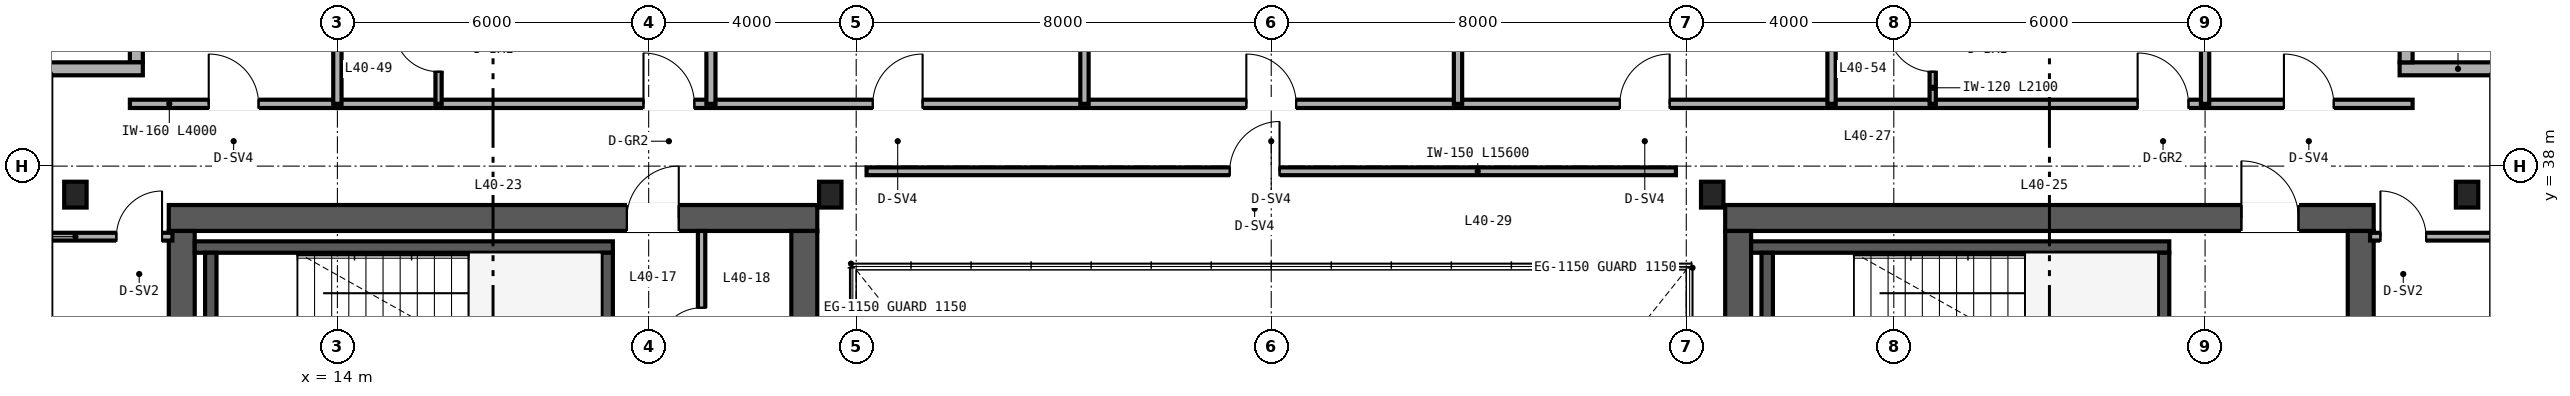
"""IFC4 building model, lengths in metres.
Left out: names, types, materials, properties, quantities, classifications, styles, units other than length and angle.
Written with IfcOpenShell. Run it as: python <this file> out.ifc"""

import sys

from ifc_helpers import new_model, si_unit, direction, frame, frame_2d, origin, origin_2d, place, context, subcontext, project, spatial, rectangle, i_section, extrude, source, transform, mapped, element, fill, save


model = new_model("IFC4")
c1 = context("Model", 3, precision=1e-05, world=origin(), true_north=direction((0.0, 1.0)))
c2 = subcontext(c1, "Body", "Model", "MODEL_VIEW")
j1 = project(units=[si_unit("LENGTHUNIT", "METRE"), si_unit("PLANEANGLEUNIT", "RADIAN")], contexts=[c1])
p1 = place(None, origin())
s1 = spatial("IfcSite", under=j1, at=p1, CompositionType="ELEMENT")
p2 = place(p1, origin())
s2 = spatial("IfcBuilding", under=s1, at=p2, CompositionType="ELEMENT")
p3 = place(p2, frame((0.0, 0.0, 163.2)))
s3 = spatial("IfcBuildingStorey", under=s2, at=p3, CompositionType="ELEMENT", Elevation=163.2)
p4 = place(p3, frame((10.75, 37.0, 0.0), z_axis=(0.0, 0.0, 1.0), x_axis=(1.0, 0.0, 0.0)))
e1 = element("IfcWall", 1, at=p4, inside=s3, PredefinedType="SHEAR", context=c2, shape_type="SweptSolid", body=[
    extrude(rectangle(XDim=12.5, YDim=0.5, at=frame_2d((6.25, 0.0))), origin(), (0.0, 0.0, 1.0), 3.37),
])
p5 = place(p4, frame((8.83, 0.0, 0.0)))
e2 = element("IfcOpeningElement", 2, at=p5, cuts=e1, PredefinedType="OPENING", context=c2, shape_type="SweptSolid", body=[
    extrude(rectangle(XDim=1.0, YDim=2.15, at=frame_2d((0.5, 1.075))), frame((0.0, 0.26, 0.0), z_axis=(0.0, -1.0, 0.0), x_axis=(1.0, 0.0, 0.0)), (0.0, 0.0, 1.0), 0.52),
])
for number, where, z_axis, x_axis in (
    (3, (11.0, 15.25, 0.0), (0.0, 0.0, 1.0), (0.0, 1.0, 0.0)),
    (4, (23.0, 15.25, 0.0), (0.0, 0.0, 1.0), (0.0, 1.0, 0.0)),
):
    element("IfcWall", number, at=place(p3, frame(where, z_axis=z_axis, x_axis=x_axis)), inside=s3, PredefinedType="SHEAR", context=c2, shape_type="SweptSolid", body=[
        extrude(rectangle(XDim=21.5, YDim=0.5, at=frame_2d((10.75, 0.0))), origin(), (0.0, 0.0, 1.0), 3.37),
    ])
p6 = place(p3, frame((40.75, 37.0, 0.0), z_axis=(0.0, 0.0, 1.0), x_axis=(1.0, 0.0, 0.0)))
e5 = element("IfcWall", 5, at=p6, inside=s3, PredefinedType="SHEAR", context=c2, shape_type="SweptSolid", body=[
    extrude(rectangle(XDim=12.5, YDim=0.5, at=frame_2d((6.25, 0.0))), origin(), (0.0, 0.0, 1.0), 3.37),
])
p7 = place(p6, frame((9.95, 0.0, 0.0)))
e6 = element("IfcOpeningElement", 6, at=p7, cuts=e5, PredefinedType="OPENING", context=c2, shape_type="SweptSolid", body=[
    extrude(rectangle(XDim=1.1, YDim=2.15, at=frame_2d((0.55, 1.075))), frame((0.0, 0.26, 0.0), z_axis=(0.0, -1.0, 0.0), x_axis=(1.0, 0.0, 0.0)), (0.0, 0.0, 1.0), 0.52),
])
for number, where, z_axis, x_axis in (
    (7, (41.0, 15.25, 0.0), (0.0, 0.0, 1.0), (0.0, 1.0, 0.0)),
    (8, (53.0, 15.25, 0.0), (0.0, 0.0, 1.0), (0.0, 1.0, 0.0)),
):
    element("IfcWall", number, at=place(p3, frame(where, z_axis=z_axis, x_axis=x_axis)), inside=s3, PredefinedType="SHEAR", context=c2, shape_type="SweptSolid", body=[
        extrude(rectangle(XDim=21.5, YDim=0.5, at=frame_2d((10.75, 0.0))), origin(), (0.0, 0.0, 1.0), 3.37),
    ])
p8 = place(p3, frame((11.25, 36.44, 0.0), z_axis=(0.0, 0.0, 1.0), x_axis=(1.0, 0.0, 0.0)))
e9 = element("IfcWall", 9, at=p8, inside=s3, PredefinedType="SHEAR", context=c2, shape_type="SweptSolid", body=[
    extrude(rectangle(XDim=8.06, YDim=0.22, at=frame_2d((4.03, 0.0))), origin(), (0.0, 0.0, 1.0), 3.4),
])
for number, where, z_axis, x_axis in (
    (10, (11.56, 33.05, 0.0), (0.0, 0.0, 1.0), (0.0, 1.0, 0.0)),
    (11, (19.2, 33.05, 0.0), (0.0, 0.0, 1.0), (0.0, 1.0, 0.0)),
):
    element("IfcWall", number, at=place(p3, frame(where, z_axis=z_axis, x_axis=x_axis)), inside=s3, PredefinedType="SHEAR", context=c2, shape_type="SweptSolid", body=[
        extrude(rectangle(XDim=3.28, YDim=0.22, at=frame_2d((1.64, 0.0))), origin(), (0.0, 0.0, 1.0), 3.4),
    ])
p9 = place(p3, frame((41.25, 36.44, 0.0), z_axis=(0.0, 0.0, 1.0), x_axis=(1.0, 0.0, 0.0)))
e12 = element("IfcWall", 12, at=p9, inside=s3, PredefinedType="SHEAR", context=c2, shape_type="SweptSolid", body=[
    extrude(rectangle(XDim=8.06, YDim=0.22, at=frame_2d((4.03, 0.0))), origin(), (0.0, 0.0, 1.0), 3.4),
])
for number, where, z_axis, x_axis in (
    (13, (41.56, 33.05, 0.0), (0.0, 0.0, 1.0), (0.0, 1.0, 0.0)),
    (14, (49.2, 33.05, 0.0), (0.0, 0.0, 1.0), (0.0, 1.0, 0.0)),
):
    element("IfcWall", number, at=place(p3, frame(where, z_axis=z_axis, x_axis=x_axis)), inside=s3, PredefinedType="SHEAR", context=c2, shape_type="SweptSolid", body=[
        extrude(rectangle(XDim=3.28, YDim=0.22, at=frame_2d((1.64, 0.0))), origin(), (0.0, 0.0, 1.0), 3.4),
    ])
m1 = source(origin(), c2, "Body", "SweptSolid", [
    extrude(i_section(OverallWidth=0.432, OverallDepth=0.498, WebThickness=0.056, FlangeThickness=0.089, FilletRadius=0.025, at=origin_2d()), origin(), (0.0, 0.0, 1.0), 3.37),
])
for number, where, z_axis, x_axis in (
    (15, (8.95, 37.45, 0.0), (0.0, 0.0, 1.0), (1.0, 0.0, 0.0)),
    (16, (23.5, 37.45, 0.0), (0.0, 0.0, 1.0), (1.0, 0.0, 0.0)),
    (17, (40.5, 37.45, 0.0), (0.0, 0.0, 1.0), (1.0, 0.0, 0.0)),
    (18, (55.05, 37.45, 0.0), (0.0, 0.0, 1.0), (1.0, 0.0, 0.0)),
):
    element("IfcColumn", number, at=place(p3, frame(where, z_axis=z_axis, x_axis=x_axis)), inside=s3, PredefinedType="COLUMN", context=c2, shape_type="MappedRepresentation", body=[
        mapped(m1, transform((0.0, 0.0, 0.0), scale=1.0)),
    ])
p10 = place(p3, frame((56.0, 39.875, 0.0), z_axis=(0.0, 0.0, 1.0), x_axis=(-1.0, 0.0, 0.0)))
e19 = element("IfcWall", 19, at=p10, inside=s3, PredefinedType="SOLIDWALL", context=c2, shape_type="SweptSolid", body=[
    extrude(rectangle(XDim=2.25, YDim=0.25, at=frame_2d((1.125, 0.0))), origin(), (0.0, 0.0, 1.0), 3.37),
])
for number, where, z_axis, x_axis in (
    (20, (53.875, 40.0, 0.0), (0.0, 0.0, 1.0), (0.0, 1.0, 0.0)),
    (21, (10.125, 42.0, 0.0), (0.0, 0.0, 1.0), (0.0, -1.0, 0.0)),
):
    element("IfcWall", number, at=place(p3, frame(where, z_axis=z_axis, x_axis=x_axis)), inside=s3, PredefinedType="SOLIDWALL", context=c2, shape_type="SweptSolid", body=[
        extrude(rectangle(XDim=2.0, YDim=0.25, at=frame_2d((1.0, 0.0))), origin(), (0.0, 0.0, 1.0), 3.37),
    ])
p11 = place(p3, frame((10.25, 39.875, 0.0), z_axis=(0.0, 0.0, 1.0), x_axis=(-1.0, 0.0, 0.0)))
e22 = element("IfcWall", 22, at=p11, inside=s3, PredefinedType="SOLIDWALL", context=c2, shape_type="SweptSolid", body=[
    extrude(rectangle(XDim=2.25, YDim=0.25, at=frame_2d((1.125, 0.0))), origin(), (0.0, 0.0, 1.0), 3.37),
])
p12 = place(p3, frame((21.02, 33.28, 0.0), z_axis=(0.0, 0.0, 1.0), x_axis=(0.0, 1.0, 0.0)))
e23 = element("IfcWall", 23, at=p12, inside=s3, PredefinedType="PARTITIONING", context=c2, shape_type="SweptSolid", body=[
    extrude(rectangle(XDim=3.47, YDim=0.142, at=frame_2d((1.735, 0.0))), origin(), (0.0, 0.0, 1.0), 3.37),
])
p13 = place(p12, frame((1.15, 0.0, 0.0)))
e24 = element("IfcOpeningElement", 24, at=p13, cuts=e23, PredefinedType="OPENING", context=c2, shape_type="SweptSolid", body=[
    extrude(rectangle(XDim=0.84, YDim=2.1, at=frame_2d((0.42, 1.05))), frame((0.0, 0.081, 0.0), z_axis=(0.0, -1.0, 0.0), x_axis=(1.0, 0.0, 0.0)), (0.0, 0.0, 1.0), 0.162),
])
p14 = place(p3, frame((24.2, 37.9, 0.0), z_axis=(0.0, 0.0, 1.0), x_axis=(1.0, 0.0, 0.0)))
e25 = element("IfcWall", 25, at=p14, inside=s3, PredefinedType="PARTITIONING", context=c2, shape_type="SweptSolid", body=[
    extrude(rectangle(XDim=15.6, YDim=0.15, at=frame_2d((7.8, 0.0))), origin(), (0.0, 0.0, 1.0), 3.37),
])
p15 = place(p14, frame((7.0, 0.0, 0.0)))
e26 = element("IfcOpeningElement", 26, at=p15, cuts=e25, PredefinedType="OPENING", context=c2, shape_type="SweptSolid", body=[
    extrude(rectangle(XDim=0.96, YDim=2.15, at=frame_2d((0.48, 1.075))), frame((0.0, 0.085, 0.0), z_axis=(0.0, -1.0, 0.0), x_axis=(1.0, 0.0, 0.0)), (0.0, 0.0, 1.0), 0.17),
])
p16 = place(p3, frame((8.16, 36.64, 0.0), z_axis=(0.0, 0.0, 1.0), x_axis=(1.0, 0.0, 0.0)))
e27 = element("IfcWall", 27, at=p16, inside=s3, PredefinedType="PARTITIONING", context=c2, shape_type="SweptSolid", body=[
    extrude(rectangle(XDim=2.66, YDim=0.15, at=frame_2d((1.33, 0.0))), origin(), (0.0, 0.0, 1.0), 2.753),
])
p17 = place(p16, frame((1.58, 0.0, 0.0)))
e28 = element("IfcOpeningElement", 28, at=p17, cuts=e27, PredefinedType="OPENING", context=c2, shape_type="SweptSolid", body=[
    extrude(rectangle(XDim=0.88, YDim=2.15, at=frame_2d((0.44, 1.075))), frame((0.0, 0.085, 0.0), z_axis=(0.0, -1.0, 0.0), x_axis=(1.0, 0.0, 0.0)), (0.0, 0.0, 1.0), 0.17),
])
p18 = place(p3, frame((53.18, 36.64, 0.0), z_axis=(0.0, 0.0, 1.0), x_axis=(1.0, 0.0, 0.0)))
e29 = element("IfcWall", 29, at=p18, inside=s3, PredefinedType="PARTITIONING", context=c2, shape_type="SweptSolid", body=[
    extrude(rectangle(XDim=2.66, YDim=0.15, at=frame_2d((1.33, 0.0))), origin(), (0.0, 0.0, 1.0), 2.753),
])
p19 = place(p18, frame((0.2, 0.0, 0.0)))
e30 = element("IfcOpeningElement", 30, at=p19, cuts=e29, PredefinedType="OPENING", context=c2, shape_type="SweptSolid", body=[
    extrude(rectangle(XDim=0.88, YDim=2.15, at=frame_2d((0.44, 1.075))), frame((0.0, 0.085, 0.0), z_axis=(0.0, -1.0, 0.0), x_axis=(1.0, 0.0, 0.0)), (0.0, 0.0, 1.0), 0.17),
])
p20 = place(p3, frame((10.0, 39.2, 0.0), z_axis=(0.0, 0.0, 1.0), x_axis=(1.0, 0.0, 0.0)))
e31 = element("IfcWall", 31, at=p20, inside=s3, PredefinedType="PARTITIONING", context=c2, shape_type="SweptSolid", body=[
    extrude(rectangle(XDim=4.0, YDim=0.16, at=frame_2d((2.0, 0.0))), origin(), (0.0, 0.0, 1.0), 3.37),
])
p21 = place(p20, frame((1.52, 0.0, 0.0)))
e32 = element("IfcOpeningElement", 32, at=p21, cuts=e31, PredefinedType="OPENING", context=c2, shape_type="SweptSolid", body=[
    extrude(rectangle(XDim=0.96, YDim=2.15, at=frame_2d((0.48, 1.075))), frame((0.0, 0.09, 0.0), z_axis=(0.0, -1.0, 0.0), x_axis=(1.0, 0.0, 0.0)), (0.0, 0.0, 1.0), 0.18),
])
p22 = place(p3, frame((50.0, 39.2, 0.0), z_axis=(0.0, 0.0, 1.0), x_axis=(1.0, 0.0, 0.0)))
e33 = element("IfcWall", 33, at=p22, inside=s3, PredefinedType="PARTITIONING", context=c2, shape_type="SweptSolid", body=[
    extrude(rectangle(XDim=4.0, YDim=0.16, at=frame_2d((2.0, 0.0))), origin(), (0.0, 0.0, 1.0), 3.37),
])
p23 = place(p22, frame((1.52, 0.0, 0.0)))
e34 = element("IfcOpeningElement", 34, at=p23, cuts=e33, PredefinedType="OPENING", context=c2, shape_type="SweptSolid", body=[
    extrude(rectangle(XDim=0.96, YDim=2.15, at=frame_2d((0.48, 1.075))), frame((0.0, 0.09, 0.0), z_axis=(0.0, -1.0, 0.0), x_axis=(1.0, 0.0, 0.0)), (0.0, 0.0, 1.0), 0.18),
])
p24 = place(p3, frame((14.0, 39.2, 0.0), z_axis=(0.0, 0.0, 1.0), x_axis=(1.0, 0.0, 0.0)))
e35 = element("IfcWall", 35, at=p24, inside=s3, PredefinedType="PARTITIONING", context=c2, shape_type="SweptSolid", body=[
    extrude(rectangle(XDim=36.0, YDim=0.16, at=frame_2d((18.0, 0.0))), origin(), (0.0, 0.0, 1.0), 2.913),
])
p25 = place(p24, frame((5.9, 0.0, 0.0)))
e36 = element("IfcOpeningElement", 36, at=p25, cuts=e35, PredefinedType="OPENING", context=c2, shape_type="SweptSolid", body=[
    extrude(rectangle(XDim=0.98, YDim=2.2, at=frame_2d((0.49, 1.1))), frame((0.0, 0.09, 0.0), z_axis=(0.0, -1.0, 0.0), x_axis=(1.0, 0.0, 0.0)), (0.0, 0.0, 1.0), 0.18),
])
p26 = place(p24, frame((10.32, 0.0, 0.0)))
e37 = element("IfcOpeningElement", 37, at=p26, cuts=e35, PredefinedType="OPENING", context=c2, shape_type="SweptSolid", body=[
    extrude(rectangle(XDim=0.96, YDim=2.15, at=frame_2d((0.48, 1.075))), frame((0.0, 0.09, 0.0), z_axis=(0.0, -1.0, 0.0), x_axis=(1.0, 0.0, 0.0)), (0.0, 0.0, 1.0), 0.18),
])
p27 = place(p24, frame((17.52, 0.0, 0.0)))
e38 = element("IfcOpeningElement", 38, at=p27, cuts=e35, PredefinedType="OPENING", context=c2, shape_type="SweptSolid", body=[
    extrude(rectangle(XDim=0.96, YDim=2.15, at=frame_2d((0.48, 1.075))), frame((0.0, 0.09, 0.0), z_axis=(0.0, -1.0, 0.0), x_axis=(1.0, 0.0, 0.0)), (0.0, 0.0, 1.0), 0.18),
])
p28 = place(p24, frame((24.72, 0.0, 0.0)))
e39 = element("IfcOpeningElement", 39, at=p28, cuts=e35, PredefinedType="OPENING", context=c2, shape_type="SweptSolid", body=[
    extrude(rectangle(XDim=0.96, YDim=2.15, at=frame_2d((0.48, 1.075))), frame((0.0, 0.09, 0.0), z_axis=(0.0, -1.0, 0.0), x_axis=(1.0, 0.0, 0.0)), (0.0, 0.0, 1.0), 0.18),
])
p29 = place(p24, frame((34.7, 0.0, 0.0)))
e40 = element("IfcOpeningElement", 40, at=p29, cuts=e35, PredefinedType="OPENING", context=c2, shape_type="SweptSolid", body=[
    extrude(rectangle(XDim=0.98, YDim=2.2, at=frame_2d((0.49, 1.1))), frame((0.0, 0.09, 0.0), z_axis=(0.0, -1.0, 0.0), x_axis=(1.0, 0.0, 0.0)), (0.0, 0.0, 1.0), 0.18),
])
for number, where, z_axis, x_axis in (
    (41, (14.0, 39.2, 0.0), (0.0, 0.0, 1.0), (0.0, 1.0, 0.0)),
    (42, (50.0, 39.2, 0.0), (0.0, 0.0, 1.0), (0.0, 1.0, 0.0)),
):
    element("IfcWall", number, at=place(p3, frame(where, z_axis=z_axis, x_axis=x_axis)), inside=s3, PredefinedType="PARTITIONING", context=c2, shape_type="SweptSolid", body=[
        extrude(rectangle(XDim=6.44, YDim=0.16, at=frame_2d((3.22, 0.0))), origin(), (0.0, 0.0, 1.0), 2.677),
    ])
p30 = place(p3, frame((21.2, 39.2, 0.0), z_axis=(0.0, 0.0, 1.0), x_axis=(0.0, 1.0, 0.0)))
e43 = element("IfcWall", 43, at=p30, inside=s3, PredefinedType="PARTITIONING", context=c2, shape_type="SweptSolid", body=[
    extrude(rectangle(XDim=6.44, YDim=0.175, at=frame_2d((3.22, 0.0))), origin(), (0.0, 0.0, 1.0), 2.833),
])
p31 = place(p3, frame((15.95, 39.2, 0.0), z_axis=(0.0, 0.0, 1.0), x_axis=(0.0, 1.0, 0.0)))
e44 = element("IfcWall", 44, at=p31, inside=s3, PredefinedType="PARTITIONING", context=c2, shape_type="SweptSolid", body=[
    extrude(rectangle(XDim=2.1, YDim=0.12, at=frame_2d((1.05, 0.0))), origin(), (0.0, 0.0, 1.0), 3.37),
])
p32 = place(p31, frame((0.62, 0.0, 0.0)))
e45 = element("IfcOpeningElement", 45, at=p32, cuts=e44, PredefinedType="OPENING", context=c2, shape_type="SweptSolid", body=[
    extrude(rectangle(XDim=0.86, YDim=2.1, at=frame_2d((0.43, 1.05))), frame((0.0, 0.07, 0.0), z_axis=(0.0, -1.0, 0.0), x_axis=(1.0, 0.0, 0.0)), (0.0, 0.0, 1.0), 0.14),
])
for number, where, z_axis, x_axis in (
    (46, (28.4, 39.2, 0.0), (0.0, 0.0, 1.0), (0.0, 1.0, 0.0)),
    (47, (35.6, 39.2, 0.0), (0.0, 0.0, 1.0), (0.0, 1.0, 0.0)),
):
    element("IfcWall", number, at=place(p3, frame(where, z_axis=z_axis, x_axis=x_axis)), inside=s3, PredefinedType="PARTITIONING", context=c2, shape_type="SweptSolid", body=[
        extrude(rectangle(XDim=6.44, YDim=0.16, at=frame_2d((3.22, 0.0))), origin(), (0.0, 0.0, 1.0), 2.443),
    ])
p33 = place(p3, frame((42.8, 39.2, 0.0), z_axis=(0.0, 0.0, 1.0), x_axis=(0.0, 1.0, 0.0)))
e48 = element("IfcWall", 48, at=p33, inside=s3, PredefinedType="PARTITIONING", context=c2, shape_type="SweptSolid", body=[
    extrude(rectangle(XDim=6.44, YDim=0.16, at=frame_2d((3.22, 0.0))), origin(), (0.0, 0.0, 1.0), 2.833),
])
p34 = place(p3, frame((44.75, 39.2, 0.0), z_axis=(0.0, 0.0, 1.0), x_axis=(0.0, 1.0, 0.0)))
e49 = element("IfcWall", 49, at=p34, inside=s3, PredefinedType="PARTITIONING", context=c2, shape_type="SweptSolid", body=[
    extrude(rectangle(XDim=2.1, YDim=0.12, at=frame_2d((1.05, 0.0))), origin(), (0.0, 0.0, 1.0), 3.37),
])
p35 = place(p34, frame((0.62, 0.0, 0.0)))
e50 = element("IfcOpeningElement", 50, at=p35, cuts=e49, PredefinedType="OPENING", context=c2, shape_type="SweptSolid", body=[
    extrude(rectangle(XDim=0.86, YDim=2.1, at=frame_2d((0.43, 1.05))), frame((0.0, 0.07, 0.0), z_axis=(0.0, -1.0, 0.0), x_axis=(1.0, 0.0, 0.0)), (0.0, 0.0, 1.0), 0.14),
])
m2 = source(origin(), c2, "Body", "SweptSolid", [
    extrude(rectangle(XDim=0.84, YDim=2.1, at=frame_2d((0.42, 1.05))), frame((0.0, 0.025, 0.0), z_axis=(0.0, -1.0, 0.0), x_axis=(1.0, 0.0, 0.0)), (0.0, 0.0, 1.0), 0.05),
])
p36 = place(p13, origin())
e51 = element("IfcDoor", 51, at=p36, inside=s3, OperationType="SINGLE_SWING_LEFT", PredefinedType="DOOR", context=c2, shape_type="MappedRepresentation", body=[
    mapped(m2, transform((0.0, 0.0, 0.0), scale=1.0)),
])
fill(e24, e51)
m3 = source(origin(), c2, "Body", "SweptSolid", [
    extrude(rectangle(XDim=1.0, YDim=2.15, at=frame_2d((0.5, 1.075))), frame((0.0, 0.025, 0.0), z_axis=(0.0, -1.0, 0.0), x_axis=(1.0, 0.0, 0.0)), (0.0, 0.0, 1.0), 0.05),
])
p37 = place(p5, origin())
e52 = element("IfcDoor", 52, at=p37, inside=s3, OperationType="SINGLE_SWING_RIGHT", PredefinedType="DOOR", context=c2, shape_type="MappedRepresentation", body=[
    mapped(m3, transform((0.0, 0.0, 0.0), scale=1.0)),
])
fill(e2, e52)
m4 = source(origin(), c2, "Body", "SweptSolid", [
    extrude(rectangle(XDim=1.1, YDim=2.15, at=frame_2d((0.55, 1.075))), frame((0.0, 0.025, 0.0), z_axis=(0.0, -1.0, 0.0), x_axis=(1.0, 0.0, 0.0)), (0.0, 0.0, 1.0), 0.05),
])
p38 = place(p7, origin())
e53 = element("IfcDoor", 53, at=p38, inside=s3, OperationType="SINGLE_SWING_LEFT", PredefinedType="DOOR", context=c2, shape_type="MappedRepresentation", body=[
    mapped(m4, transform((0.0, 0.0, 0.0), scale=1.0)),
])
fill(e6, e53)
m5 = source(origin(), c2, "Body", "SweptSolid", [
    extrude(rectangle(XDim=0.96, YDim=2.15, at=frame_2d((0.48, 1.075))), frame((0.0, 0.025, 0.0), z_axis=(0.0, -1.0, 0.0), x_axis=(1.0, 0.0, 0.0)), (0.0, 0.0, 1.0), 0.05),
])
p39 = place(p15, origin())
e54 = element("IfcDoor", 54, at=p39, inside=s3, OperationType="SINGLE_SWING_RIGHT", PredefinedType="DOOR", context=c2, shape_type="MappedRepresentation", body=[
    mapped(m5, transform((0.0, 0.0, 0.0), scale=1.0)),
])
fill(e26, e54)
m6 = source(origin(), c2, "Body", "SweptSolid", [
    extrude(rectangle(XDim=0.88, YDim=2.15, at=frame_2d((0.44, 1.075))), frame((0.0, 0.025, 0.0), z_axis=(0.0, -1.0, 0.0), x_axis=(1.0, 0.0, 0.0)), (0.0, 0.0, 1.0), 0.05),
])
p40 = place(p17, origin())
e55 = element("IfcDoor", 55, at=p40, inside=s3, OperationType="SINGLE_SWING_RIGHT", PredefinedType="DOOR", context=c2, shape_type="MappedRepresentation", body=[
    mapped(m6, transform((0.0, 0.0, 0.0), scale=1.0)),
])
fill(e28, e55)
p41 = place(p19, origin())
e56 = element("IfcDoor", 56, at=p41, inside=s3, OperationType="SINGLE_SWING_LEFT", PredefinedType="DOOR", context=c2, shape_type="MappedRepresentation", body=[
    mapped(m6, transform((0.0, 0.0, 0.0), scale=1.0)),
])
fill(e30, e56)
p42 = place(p21, origin())
e57 = element("IfcDoor", 57, at=p42, inside=s3, OperationType="SINGLE_SWING_LEFT", PredefinedType="DOOR", context=c2, shape_type="MappedRepresentation", body=[
    mapped(m5, transform((0.0, 0.0, 0.0), scale=1.0)),
])
fill(e32, e57)
p43 = place(p23, origin())
e58 = element("IfcDoor", 58, at=p43, inside=s3, OperationType="SINGLE_SWING_LEFT", PredefinedType="DOOR", context=c2, shape_type="MappedRepresentation", body=[
    mapped(m5, transform((0.0, 0.0, 0.0), scale=1.0)),
])
fill(e34, e58)
m7 = source(origin(), c2, "Body", "SweptSolid", [
    extrude(rectangle(XDim=0.86, YDim=2.1, at=frame_2d((0.43, 1.05))), frame((0.0, 0.025, 0.0), z_axis=(0.0, -1.0, 0.0), x_axis=(1.0, 0.0, 0.0)), (0.0, 0.0, 1.0), 0.05),
])
p44 = place(p32, origin())
e59 = element("IfcDoor", 59, at=p44, inside=s3, OperationType="SINGLE_SWING_RIGHT", PredefinedType="DOOR", context=c2, shape_type="MappedRepresentation", body=[
    mapped(m7, transform((0.0, 0.0, 0.0), scale=1.0)),
])
fill(e45, e59)
p45 = place(p35, origin())
e60 = element("IfcDoor", 60, at=p45, inside=s3, OperationType="SINGLE_SWING_RIGHT", PredefinedType="DOOR", context=c2, shape_type="MappedRepresentation", body=[
    mapped(m7, transform((0.0, 0.0, 0.0), scale=1.0)),
])
fill(e50, e60)
m8 = source(origin(), c2, "Body", "SweptSolid", [
    extrude(rectangle(XDim=0.98, YDim=2.2, at=frame_2d((0.49, 1.1))), frame((0.0, 0.025, 0.0), z_axis=(0.0, -1.0, 0.0), x_axis=(1.0, 0.0, 0.0)), (0.0, 0.0, 1.0), 0.05),
])
p46 = place(p25, origin())
e61 = element("IfcDoor", 61, at=p46, inside=s3, OperationType="SINGLE_SWING_LEFT", PredefinedType="DOOR", context=c2, shape_type="MappedRepresentation", body=[
    mapped(m8, transform((0.0, 0.0, 0.0), scale=1.0)),
])
fill(e36, e61)
p47 = place(p26, origin())
e62 = element("IfcDoor", 62, at=p47, inside=s3, OperationType="SINGLE_SWING_RIGHT", PredefinedType="DOOR", context=c2, shape_type="MappedRepresentation", body=[
    mapped(m5, transform((0.0, 0.0, 0.0), scale=1.0)),
])
fill(e37, e62)
p48 = place(p27, origin())
e63 = element("IfcDoor", 63, at=p48, inside=s3, OperationType="SINGLE_SWING_LEFT", PredefinedType="DOOR", context=c2, shape_type="MappedRepresentation", body=[
    mapped(m5, transform((0.0, 0.0, 0.0), scale=1.0)),
])
fill(e38, e63)
p49 = place(p28, origin())
e64 = element("IfcDoor", 64, at=p49, inside=s3, OperationType="SINGLE_SWING_RIGHT", PredefinedType="DOOR", context=c2, shape_type="MappedRepresentation", body=[
    mapped(m5, transform((0.0, 0.0, 0.0), scale=1.0)),
])
fill(e39, e64)
p50 = place(p29, origin())
e65 = element("IfcDoor", 65, at=p50, inside=s3, OperationType="SINGLE_SWING_LEFT", PredefinedType="DOOR", context=c2, shape_type="MappedRepresentation", body=[
    mapped(m8, transform((0.0, 0.0, 0.0), scale=1.0)),
])
fill(e40, e65)
save(model, sys.argv[1])
